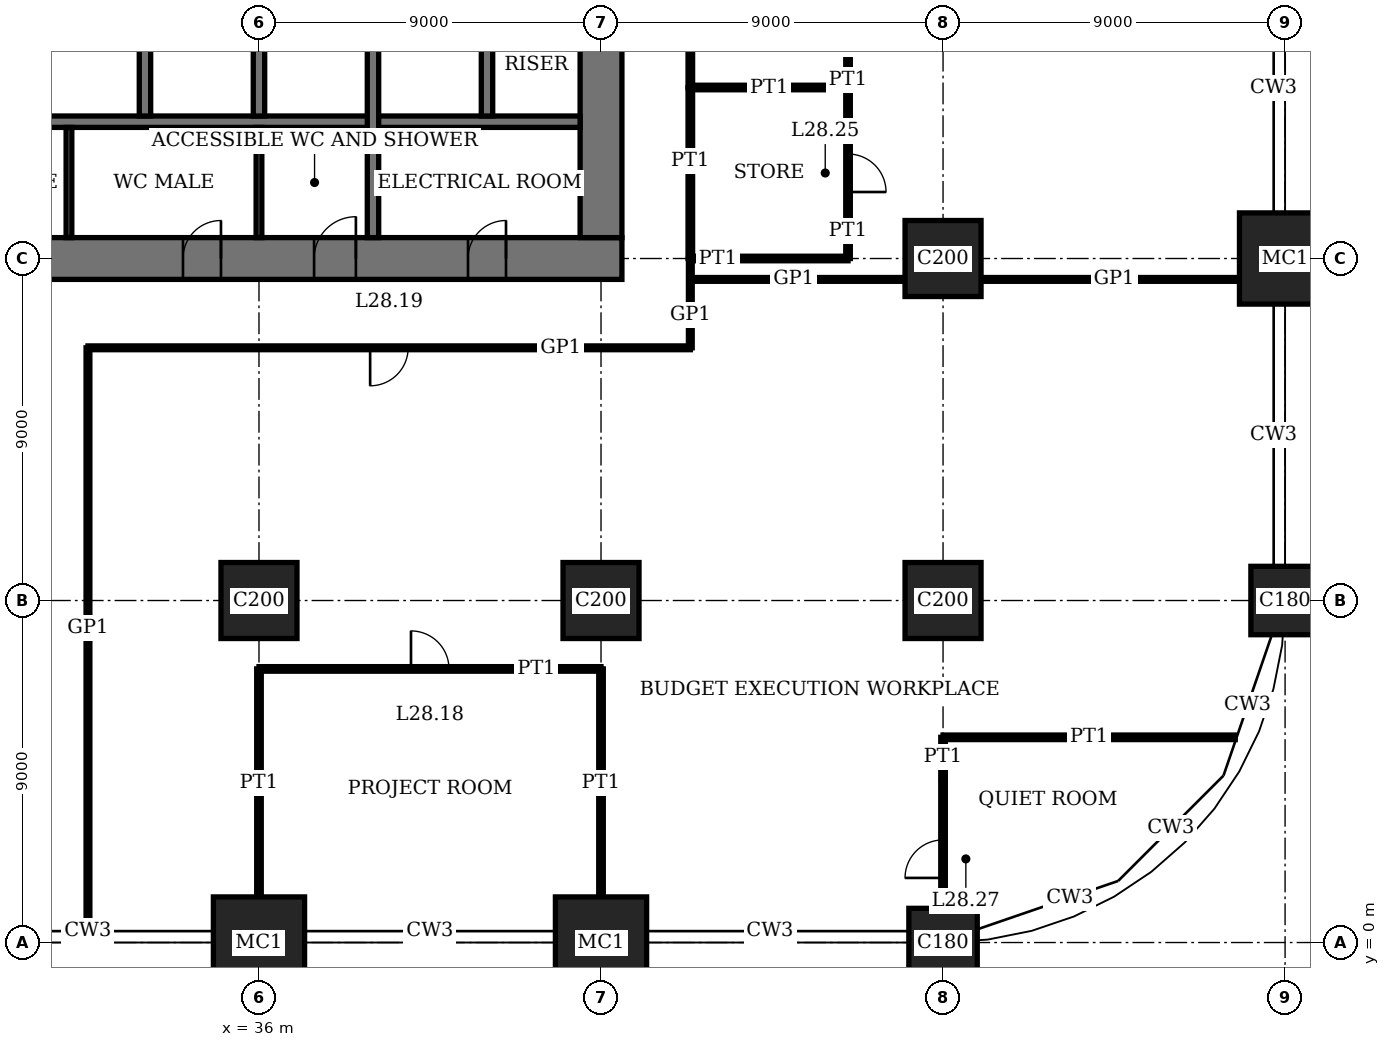
"""IFC4 building model, lengths in metres.
Left out: names, types, materials, properties, quantities, classifications, styles, units other than length and angle.
Written with IfcOpenShell. Run it as: python <this file> out.ifc"""

import sys

from ifc_helpers import new_model, si_unit, direction, frame, frame_2d, origin, origin_2d, place, context, subcontext, project, spatial, rectangle, extrude, element, fill, save


model = new_model("IFC4")
c1 = context("Model", 3, precision=1e-05, world=origin(), true_north=direction((0.0, 1.0)))
c2 = subcontext(c1, "Body", "Model", "MODEL_VIEW")
j1 = project(units=[si_unit("LENGTHUNIT", "METRE"), si_unit("PLANEANGLEUNIT", "RADIAN")], contexts=[c1])
p1 = place(None, origin())
s1 = spatial("IfcSite", under=j1, at=p1, CompositionType="ELEMENT")
p2 = place(p1, origin())
s2 = spatial("IfcBuilding", under=s1, at=p2, CompositionType="ELEMENT")
p3 = place(p2, frame((0.0, 0.0, 117.0)))
s3 = spatial("IfcBuildingStorey", under=s2, at=p3, CompositionType="ELEMENT", Elevation=117.0)
p4 = place(p3, frame((36.0, 0.0, 0.0), z_axis=(0.0, 0.0, 1.0), x_axis=(1.0, 0.0, 0.0)))
e1 = element("IfcColumn", 1, at=p4, inside=s3, PredefinedType="COLUMN", context=c2, shape_type="SweptSolid", body=[
    extrude(rectangle(XDim=2.4, YDim=2.4, at=origin_2d()), origin(), (0.0, 0.0, 1.0), 4.0),
])
p5 = place(p3, frame((36.0, 9.0, 0.0), z_axis=(0.0, 0.0, 1.0), x_axis=(1.0, 0.0, 0.0)))
e2 = element("IfcColumn", 2, at=p5, inside=s3, PredefinedType="COLUMN", context=c2, shape_type="SweptSolid", body=[
    extrude(rectangle(XDim=2.0, YDim=2.0, at=origin_2d()), origin(), (0.0, 0.0, 1.0), 4.0),
])
p6 = place(p3, frame((45.0, 0.0, 0.0), z_axis=(0.0, 0.0, 1.0), x_axis=(1.0, 0.0, 0.0)))
e3 = element("IfcColumn", 3, at=p6, inside=s3, PredefinedType="COLUMN", context=c2, shape_type="SweptSolid", body=[
    extrude(rectangle(XDim=2.4, YDim=2.4, at=origin_2d()), origin(), (0.0, 0.0, 1.0), 4.0),
])
p7 = place(p3, frame((45.0, 9.0, 0.0), z_axis=(0.0, 0.0, 1.0), x_axis=(1.0, 0.0, 0.0)))
e4 = element("IfcColumn", 4, at=p7, inside=s3, PredefinedType="COLUMN", context=c2, shape_type="SweptSolid", body=[
    extrude(rectangle(XDim=2.0, YDim=2.0, at=origin_2d()), origin(), (0.0, 0.0, 1.0), 4.0),
])
p8 = place(p3, frame((54.0, 0.0, 0.0), z_axis=(0.0, 0.0, 1.0), x_axis=(1.0, 0.0, 0.0)))
e5 = element("IfcColumn", 5, at=p8, inside=s3, PredefinedType="COLUMN", context=c2, shape_type="SweptSolid", body=[
    extrude(rectangle(XDim=1.8, YDim=1.8, at=origin_2d()), origin(), (0.0, 0.0, 1.0), 4.0),
])
for number, where, z_axis, x_axis in (
    (6, (54.0, 9.0, 0.0), (0.0, 0.0, 1.0), (1.0, 0.0, 0.0)),
    (7, (54.0, 18.0, 0.0), (0.0, 0.0, 1.0), (1.0, 0.0, 0.0)),
):
    element("IfcColumn", number, at=place(p3, frame(where, z_axis=z_axis, x_axis=x_axis)), inside=s3, PredefinedType="COLUMN", context=c2, shape_type="SweptSolid", body=[
        extrude(rectangle(XDim=2.0, YDim=2.0, at=origin_2d()), origin(), (0.0, 0.0, 1.0), 4.0),
    ])
p9 = place(p3, frame((63.0, 9.0, 0.0), z_axis=(0.0, 0.0, 1.0), x_axis=(1.0, 0.0, 0.0)))
e8 = element("IfcColumn", 8, at=p9, inside=s3, PredefinedType="COLUMN", context=c2, shape_type="SweptSolid", body=[
    extrude(rectangle(XDim=1.8, YDim=1.8, at=origin_2d()), origin(), (0.0, 0.0, 1.0), 4.0),
])
p10 = place(p3, frame((63.0, 18.0, 0.0), z_axis=(0.0, 0.0, 1.0), x_axis=(1.0, 0.0, 0.0)))
e9 = element("IfcColumn", 9, at=p10, inside=s3, PredefinedType="COLUMN", context=c2, shape_type="SweptSolid", body=[
    extrude(rectangle(XDim=2.4, YDim=2.4, at=origin_2d()), origin(), (0.0, 0.0, 1.0), 4.0),
])
p11 = place(p3, frame((17.45, 18.0, 0.0), z_axis=(0.0, 0.0, 1.0), x_axis=(1.0, 0.0, 0.0)))
e10 = element("IfcWall", 10, at=p11, inside=s3, PredefinedType="SHEAR", context=c2, shape_type="SweptSolid", body=[
    extrude(rectangle(XDim=28.1, YDim=1.1, at=frame_2d((14.05, 0.0))), origin(), (0.0, 0.0, 1.0), 4.0),
])
p12 = place(p11, frame((11.55, 0.0, 0.0)))
e11 = element("IfcOpeningElement", 11, at=p12, cuts=e10, PredefinedType="OPENING", context=c2, shape_type="SweptSolid", body=[
    extrude(rectangle(XDim=1.0, YDim=2.4, at=frame_2d((0.5, 1.2))), frame((0.0, 0.56, 0.0), z_axis=(0.0, -1.0, 0.0), x_axis=(1.0, 0.0, 0.0)), (0.0, 0.0, 1.0), 1.12),
])
p13 = place(p11, frame((16.55, 0.0, 0.0)))
e12 = element("IfcOpeningElement", 12, at=p13, cuts=e10, PredefinedType="OPENING", context=c2, shape_type="SweptSolid", body=[
    extrude(rectangle(XDim=1.0, YDim=2.4, at=frame_2d((0.5, 1.2))), frame((0.0, 0.56, 0.0), z_axis=(0.0, -1.0, 0.0), x_axis=(1.0, 0.0, 0.0)), (0.0, 0.0, 1.0), 1.12),
])
p14 = place(p11, frame((20.0, 0.0, 0.0)))
e13 = element("IfcOpeningElement", 13, at=p14, cuts=e10, PredefinedType="OPENING", context=c2, shape_type="SweptSolid", body=[
    extrude(rectangle(XDim=1.1, YDim=2.4, at=frame_2d((0.55, 1.2))), frame((0.0, 0.56, 0.0), z_axis=(0.0, -1.0, 0.0), x_axis=(1.0, 0.0, 0.0)), (0.0, 0.0, 1.0), 1.12),
])
p15 = place(p11, frame((24.05, 0.0, 0.0)))
e14 = element("IfcOpeningElement", 14, at=p15, cuts=e10, PredefinedType="OPENING", context=c2, shape_type="SweptSolid", body=[
    extrude(rectangle(XDim=1.0, YDim=2.4, at=frame_2d((0.5, 1.2))), frame((0.0, 0.56, 0.0), z_axis=(0.0, -1.0, 0.0), x_axis=(1.0, 0.0, 0.0)), (0.0, 0.0, 1.0), 1.12),
])
p16 = place(p3, frame((45.0, 18.55, 0.0), z_axis=(0.0, 0.0, 1.0), x_axis=(0.0, 1.0, 0.0)))
e15 = element("IfcWall", 15, at=p16, inside=s3, PredefinedType="SHEAR", context=c2, shape_type="SweptSolid", body=[
    extrude(rectangle(XDim=16.9, YDim=1.1, at=frame_2d((8.45, 0.0))), origin(), (0.0, 0.0, 1.0), 4.0),
])
p17 = place(p16, frame((8.45, 0.0, 0.0)))
e16 = element("IfcOpeningElement", 16, at=p17, cuts=e15, PredefinedType="OPENING", context=c2, shape_type="SweptSolid", body=[
    extrude(rectangle(XDim=1.8, YDim=2.4, at=frame_2d((0.9, 1.2))), frame((0.0, 0.56, 0.0), z_axis=(0.0, -1.0, 0.0), x_axis=(1.0, 0.0, 0.0)), (0.0, 0.0, 1.0), 1.12),
])
p18 = place(p3, frame((27.15, 21.6, 0.0), z_axis=(0.0, 0.0, 1.0), x_axis=(1.0, 0.0, 0.0)))
e17 = element("IfcWall", 17, at=p18, inside=s3, PredefinedType="SHEAR", context=c2, shape_type="SweptSolid", body=[
    extrude(rectangle(XDim=17.3, YDim=0.3, at=frame_2d((8.65, 0.0))), origin(), (0.0, 0.0, 1.0), 4.0),
])
for number, where, z_axis, x_axis in (
    (18, (33.0, 21.75, 0.0), (0.0, 0.0, 1.0), (0.0, 1.0, 0.0)),
    (19, (36.0, 21.75, 0.0), (0.0, 0.0, 1.0), (0.0, 1.0, 0.0)),
):
    element("IfcWall", number, at=place(p3, frame(where, z_axis=z_axis, x_axis=x_axis)), inside=s3, PredefinedType="SHEAR", context=c2, shape_type="SweptSolid", body=[
        extrude(rectangle(XDim=2.7, YDim=0.3, at=frame_2d((1.35, 0.0))), origin(), (0.0, 0.0, 1.0), 4.0),
    ])
p19 = place(p3, frame((39.0, 18.55, 0.0), z_axis=(0.0, 0.0, 1.0), x_axis=(0.0, 1.0, 0.0)))
e20 = element("IfcWall", 20, at=p19, inside=s3, PredefinedType="SHEAR", context=c2, shape_type="SweptSolid", body=[
    extrude(rectangle(XDim=5.9, YDim=0.3, at=frame_2d((2.95, 0.0))), origin(), (0.0, 0.0, 1.0), 4.0),
])
p20 = place(p3, frame((42.0, 21.75, 0.0), z_axis=(0.0, 0.0, 1.0), x_axis=(0.0, 1.0, 0.0)))
e21 = element("IfcWall", 21, at=p20, inside=s3, PredefinedType="SHEAR", context=c2, shape_type="SweptSolid", body=[
    extrude(rectangle(XDim=2.7, YDim=0.3, at=frame_2d((1.35, 0.0))), origin(), (0.0, 0.0, 1.0), 4.0),
])
p21 = place(p3, frame((54.0, 5.4, 0.0), z_axis=(0.0, 0.0, 1.0), x_axis=(1.0, 0.0, 0.0)))
e22 = element("IfcWall", 22, at=p21, inside=s3, PredefinedType="PARTITIONING", context=c2, shape_type="SweptSolid", body=[
    extrude(rectangle(XDim=7.688, YDim=0.12, at=frame_2d((3.844, 0.0))), origin(), (0.0, 0.0, 1.0), 3.75),
])
p22 = place(p3, frame((36.0, 7.2, 0.0), z_axis=(0.0, 0.0, 1.0), x_axis=(1.0, 0.0, 0.0)))
e23 = element("IfcWall", 23, at=p22, inside=s3, PredefinedType="PARTITIONING", context=c2, shape_type="SweptSolid", body=[
    extrude(rectangle(XDim=9.0, YDim=0.12, at=frame_2d((4.5, 0.0))), origin(), (0.0, 0.0, 1.0), 3.75),
])
p23 = place(p22, frame((4.0, 0.0, 0.0)))
e24 = element("IfcOpeningElement", 24, at=p23, cuts=e23, PredefinedType="OPENING", context=c2, shape_type="SweptSolid", body=[
    extrude(rectangle(XDim=1.0, YDim=2.4, at=frame_2d((0.5, 1.2))), frame((0.0, 0.07, 0.0), z_axis=(0.0, -1.0, 0.0), x_axis=(1.0, 0.0, 0.0)), (0.0, 0.0, 1.0), 0.14),
])
p24 = place(p3, frame((31.5, 15.65, 0.0), z_axis=(0.0, 0.0, 1.0), x_axis=(1.0, 0.0, 0.0)))
e25 = element("IfcWall", 25, at=p24, inside=s3, PredefinedType="PARTITIONING", context=c2, shape_type="SweptSolid", body=[
    extrude(rectangle(XDim=15.85, YDim=0.1, at=frame_2d((7.925, 0.0))), origin(), (0.0, 0.0, 1.0), 3.75),
])
p25 = place(p24, frame((7.425, 0.0, 0.0)))
e26 = element("IfcOpeningElement", 26, at=p25, cuts=e25, PredefinedType="OPENING", context=c2, shape_type="SweptSolid", body=[
    extrude(rectangle(XDim=1.0, YDim=2.4, at=frame_2d((0.5, 1.2))), frame((0.0, 0.06, 0.0), z_axis=(0.0, -1.0, 0.0), x_axis=(1.0, 0.0, 0.0)), (0.0, 0.0, 1.0), 0.12),
])
p26 = place(p3, frame((47.35, 17.45, 0.0), z_axis=(0.0, 0.0, 1.0), x_axis=(1.0, 0.0, 0.0)))
e27 = element("IfcWall", 27, at=p26, inside=s3, PredefinedType="PARTITIONING", context=c2, shape_type="SweptSolid", body=[
    extrude(rectangle(XDim=5.65, YDim=0.1, at=frame_2d((2.825, 0.0))), origin(), (0.0, 0.0, 1.0), 3.75),
])
p27 = place(p3, frame((55.0, 17.45, 0.0), z_axis=(0.0, 0.0, 1.0), x_axis=(1.0, 0.0, 0.0)))
e28 = element("IfcWall", 28, at=p27, inside=s3, PredefinedType="PARTITIONING", context=c2, shape_type="SweptSolid", body=[
    extrude(rectangle(XDim=6.8, YDim=0.1, at=frame_2d((3.4, 0.0))), origin(), (0.0, 0.0, 1.0), 3.75),
])
p28 = place(p3, frame((47.35, 18.0, 0.0), z_axis=(0.0, 0.0, 1.0), x_axis=(1.0, 0.0, 0.0)))
e29 = element("IfcWall", 29, at=p28, inside=s3, PredefinedType="PARTITIONING", context=c2, shape_type="SweptSolid", body=[
    extrude(rectangle(XDim=4.15, YDim=0.12, at=frame_2d((2.075, 0.0))), origin(), (0.0, 0.0, 1.0), 3.05),
])
p29 = place(p3, frame((47.35, 22.5, 0.0), z_axis=(0.0, 0.0, 1.0), x_axis=(1.0, 0.0, 0.0)))
e30 = element("IfcWall", 30, at=p29, inside=s3, PredefinedType="PARTITIONING", context=c2, shape_type="SweptSolid", body=[
    extrude(rectangle(XDim=4.15, YDim=0.12, at=frame_2d((2.075, 0.0))), origin(), (0.0, 0.0, 1.0), 3.1),
])
p30 = place(p3, frame((31.5, 0.31, 0.0), z_axis=(0.0, 0.0, 1.0), x_axis=(0.0, 1.0, 0.0)))
e31 = element("IfcWall", 31, at=p30, inside=s3, PredefinedType="PARTITIONING", context=c2, shape_type="SweptSolid", body=[
    extrude(rectangle(XDim=15.34, YDim=0.1, at=frame_2d((7.67, 0.0))), origin(), (0.0, 0.0, 1.0), 3.75),
])
for number, where, z_axis, x_axis in (
    (32, (36.0, 1.2, 0.0), (0.0, 0.0, 1.0), (0.0, 1.0, 0.0)),
    (33, (45.0, 1.2, 0.0), (0.0, 0.0, 1.0), (0.0, 1.0, 0.0)),
):
    element("IfcWall", number, at=place(p3, frame(where, z_axis=z_axis, x_axis=x_axis)), inside=s3, PredefinedType="PARTITIONING", context=c2, shape_type="SweptSolid", body=[
        extrude(rectangle(XDim=6.0, YDim=0.12, at=frame_2d((3.0, 0.0))), origin(), (0.0, 0.0, 1.0), 3.05),
    ])
for number, where, z_axis, x_axis in (
    (34, (47.35, 18.0, 0.0), (0.0, 0.0, 1.0), (0.0, 1.0, 0.0)),
    (35, (47.35, 22.5, 0.0), (0.0, 0.0, 1.0), (0.0, 1.0, 0.0)),
):
    element("IfcWall", number, at=place(p3, frame(where, z_axis=z_axis, x_axis=x_axis)), inside=s3, PredefinedType="PARTITIONING", context=c2, shape_type="SweptSolid", body=[
        extrude(rectangle(XDim=4.5, YDim=0.12, at=frame_2d((2.25, 0.0))), origin(), (0.0, 0.0, 1.0), 3.75),
    ])
p31 = place(p3, frame((47.35, 15.65, 0.0), z_axis=(0.0, 0.0, 1.0), x_axis=(0.0, 1.0, 0.0)))
e36 = element("IfcWall", 36, at=p31, inside=s3, PredefinedType="PARTITIONING", context=c2, shape_type="SweptSolid", body=[
    extrude(rectangle(XDim=2.35, YDim=0.1, at=frame_2d((1.175, 0.0))), origin(), (0.0, 0.0, 1.0), 3.75),
])
p32 = place(p3, frame((51.5, 18.0, 0.0), z_axis=(0.0, 0.0, 1.0), x_axis=(0.0, 1.0, 0.0)))
e37 = element("IfcWall", 37, at=p32, inside=s3, PredefinedType="PARTITIONING", context=c2, shape_type="SweptSolid", body=[
    extrude(rectangle(XDim=4.5, YDim=0.12, at=frame_2d((2.25, 0.0))), origin(), (0.0, 0.0, 1.0), 3.75),
])
p33 = place(p32, frame((1.75, 0.0, 0.0)))
e38 = element("IfcOpeningElement", 38, at=p33, cuts=e37, PredefinedType="OPENING", context=c2, shape_type="SweptSolid", body=[
    extrude(rectangle(XDim=1.0, YDim=2.4, at=frame_2d((0.5, 1.2))), frame((0.0, 0.07, 0.0), z_axis=(0.0, -1.0, 0.0), x_axis=(1.0, 0.0, 0.0)), (0.0, 0.0, 1.0), 0.14),
])
p34 = place(p3, frame((51.5, 22.5, 0.0), z_axis=(0.0, 0.0, 1.0), x_axis=(0.0, 1.0, 0.0)))
e39 = element("IfcWall", 39, at=p34, inside=s3, PredefinedType="PARTITIONING", context=c2, shape_type="SweptSolid", body=[
    extrude(rectangle(XDim=4.5, YDim=0.12, at=frame_2d((2.25, 0.0))), origin(), (0.0, 0.0, 1.0), 3.75),
])
p35 = place(p34, frame((1.75, 0.0, 0.0)))
e40 = element("IfcOpeningElement", 40, at=p35, cuts=e39, PredefinedType="OPENING", context=c2, shape_type="SweptSolid", body=[
    extrude(rectangle(XDim=1.0, YDim=2.4, at=frame_2d((0.5, 1.2))), frame((0.0, 0.07, 0.0), z_axis=(0.0, -1.0, 0.0), x_axis=(1.0, 0.0, 0.0)), (0.0, 0.0, 1.0), 0.14),
])
p36 = place(p3, frame((54.0, 0.9, 0.0), z_axis=(0.0, 0.0, 1.0), x_axis=(0.0, 1.0, 0.0)))
e41 = element("IfcWall", 41, at=p36, inside=s3, PredefinedType="PARTITIONING", context=c2, shape_type="SweptSolid", body=[
    extrude(rectangle(XDim=4.5, YDim=0.12, at=frame_2d((2.25, 0.0))), origin(), (0.0, 0.0, 1.0), 3.05),
])
p37 = place(p36, frame((0.8, 0.0, 0.0)))
e42 = element("IfcOpeningElement", 42, at=p37, cuts=e41, PredefinedType="OPENING", context=c2, shape_type="SweptSolid", body=[
    extrude(rectangle(XDim=1.0, YDim=2.4, at=frame_2d((0.5, 1.2))), frame((0.0, 0.07, 0.0), z_axis=(0.0, -1.0, 0.0), x_axis=(1.0, 0.0, 0.0)), (0.0, 0.0, 1.0), 0.14),
])
for number, where, z_axis, x_axis in (
    (43, (31.0, 18.55, 0.0), (0.0, 0.0, 1.0), (0.0, 1.0, 0.0)),
    (44, (36.0, 18.55, 0.0), (0.0, 0.0, 1.0), (0.0, 1.0, 0.0)),
):
    element("IfcWall", number, at=place(p3, frame(where, z_axis=z_axis, x_axis=x_axis)), inside=s3, PredefinedType="PARTITIONING", context=c2, shape_type="SweptSolid", body=[
        extrude(rectangle(XDim=2.9, YDim=0.15, at=frame_2d((1.45, 0.0))), origin(), (0.0, 0.0, 1.0), 3.75),
    ])
p38 = place(p13, origin())
e45 = element("IfcDoor", 45, at=p38, inside=s3, OperationType="SINGLE_SWING_LEFT", PredefinedType="DOOR", context=c2, shape_type="SweptSolid", body=[
    extrude(rectangle(XDim=1.0, YDim=2.4, at=frame_2d((0.5, 1.2))), frame((0.0, 0.025, 0.0), z_axis=(0.0, -1.0, 0.0), x_axis=(1.0, 0.0, 0.0)), (0.0, 0.0, 1.0), 0.05),
    extrude(rectangle(XDim=0.04, YDim=2.4, at=frame_2d((0.02, 1.2))), frame((0.0, 0.4, 0.0), z_axis=(0.0, -1.0, 0.0), x_axis=(1.0, 0.0, 0.0)), (0.0, 0.0, 1.0), 0.8),
    extrude(rectangle(XDim=0.04, YDim=2.4, at=frame_2d((0.98, 1.2))), frame((0.0, 0.4, 0.0), z_axis=(0.0, -1.0, 0.0), x_axis=(1.0, 0.0, 0.0)), (0.0, 0.0, 1.0), 0.8),
    extrude(rectangle(XDim=1.0, YDim=0.04, at=frame_2d((0.5, 2.38))), frame((0.0, 0.4, 0.0), z_axis=(0.0, -1.0, 0.0), x_axis=(1.0, 0.0, 0.0)), (0.0, 0.0, 1.0), 0.8),
])
fill(e12, e45)
p39 = place(p14, origin())
e46 = element("IfcDoor", 46, at=p39, inside=s3, OperationType="SINGLE_SWING_LEFT", PredefinedType="DOOR", context=c2, shape_type="SweptSolid", body=[
    extrude(rectangle(XDim=1.1, YDim=2.4, at=frame_2d((0.55, 1.2))), frame((0.0, 0.025, 0.0), z_axis=(0.0, -1.0, 0.0), x_axis=(1.0, 0.0, 0.0)), (0.0, 0.0, 1.0), 0.05),
    extrude(rectangle(XDim=0.04, YDim=2.4, at=frame_2d((0.02, 1.2))), frame((0.0, 0.44, 0.0), z_axis=(0.0, -1.0, 0.0), x_axis=(1.0, 0.0, 0.0)), (0.0, 0.0, 1.0), 0.88),
    extrude(rectangle(XDim=0.04, YDim=2.4, at=frame_2d((1.08, 1.2))), frame((0.0, 0.44, 0.0), z_axis=(0.0, -1.0, 0.0), x_axis=(1.0, 0.0, 0.0)), (0.0, 0.0, 1.0), 0.88),
    extrude(rectangle(XDim=1.1, YDim=0.04, at=frame_2d((0.55, 2.38))), frame((0.0, 0.44, 0.0), z_axis=(0.0, -1.0, 0.0), x_axis=(1.0, 0.0, 0.0)), (0.0, 0.0, 1.0), 0.88),
])
fill(e13, e46)
p40 = place(p15, origin())
e47 = element("IfcDoor", 47, at=p40, inside=s3, OperationType="SINGLE_SWING_LEFT", PredefinedType="DOOR", context=c2, shape_type="SweptSolid", body=[
    extrude(rectangle(XDim=1.0, YDim=2.4, at=frame_2d((0.5, 1.2))), frame((0.0, 0.025, 0.0), z_axis=(0.0, -1.0, 0.0), x_axis=(1.0, 0.0, 0.0)), (0.0, 0.0, 1.0), 0.05),
    extrude(rectangle(XDim=0.04, YDim=2.4, at=frame_2d((0.02, 1.2))), frame((0.0, 0.4, 0.0), z_axis=(0.0, -1.0, 0.0), x_axis=(1.0, 0.0, 0.0)), (0.0, 0.0, 1.0), 0.8),
    extrude(rectangle(XDim=0.04, YDim=2.4, at=frame_2d((0.98, 1.2))), frame((0.0, 0.4, 0.0), z_axis=(0.0, -1.0, 0.0), x_axis=(1.0, 0.0, 0.0)), (0.0, 0.0, 1.0), 0.8),
    extrude(rectangle(XDim=1.0, YDim=0.04, at=frame_2d((0.5, 2.38))), frame((0.0, 0.4, 0.0), z_axis=(0.0, -1.0, 0.0), x_axis=(1.0, 0.0, 0.0)), (0.0, 0.0, 1.0), 0.8),
])
fill(e14, e47)
p41 = place(p23, origin())
e48 = element("IfcDoor", 48, at=p41, inside=s3, OperationType="SINGLE_SWING_RIGHT", PredefinedType="DOOR", context=c2, shape_type="SweptSolid", body=[
    extrude(rectangle(XDim=1.0, YDim=2.4, at=frame_2d((0.5, 1.2))), frame((0.0, 0.025, 0.0), z_axis=(0.0, -1.0, 0.0), x_axis=(1.0, 0.0, 0.0)), (0.0, 0.0, 1.0), 0.05),
])
fill(e24, e48)
p42 = place(p25, origin())
e49 = element("IfcDoor", 49, at=p42, inside=s3, OperationType="SINGLE_SWING_LEFT", PredefinedType="DOOR", context=c2, shape_type="SweptSolid", body=[
    extrude(rectangle(XDim=1.0, YDim=2.4, at=frame_2d((0.5, 1.2))), frame((0.0, 0.02, 0.0), z_axis=(0.0, -1.0, 0.0), x_axis=(1.0, 0.0, 0.0)), (0.0, 0.0, 1.0), 0.04),
])
fill(e26, e49)
p43 = place(p33, origin())
e50 = element("IfcDoor", 50, at=p43, inside=s3, OperationType="SINGLE_SWING_LEFT", PredefinedType="DOOR", context=c2, shape_type="SweptSolid", body=[
    extrude(rectangle(XDim=1.0, YDim=2.4, at=frame_2d((0.5, 1.2))), frame((0.0, 0.025, 0.0), z_axis=(0.0, -1.0, 0.0), x_axis=(1.0, 0.0, 0.0)), (0.0, 0.0, 1.0), 0.05),
])
fill(e38, e50)
p44 = place(p37, origin())
e51 = element("IfcDoor", 51, at=p44, inside=s3, OperationType="SINGLE_SWING_RIGHT", PredefinedType="DOOR", context=c2, shape_type="SweptSolid", body=[
    extrude(rectangle(XDim=1.0, YDim=2.4, at=frame_2d((0.5, 1.2))), frame((0.0, 0.025, 0.0), z_axis=(0.0, -1.0, 0.0), x_axis=(1.0, 0.0, 0.0)), (0.0, 0.0, 1.0), 0.05),
])
fill(e42, e51)
save(model, sys.argv[1])
